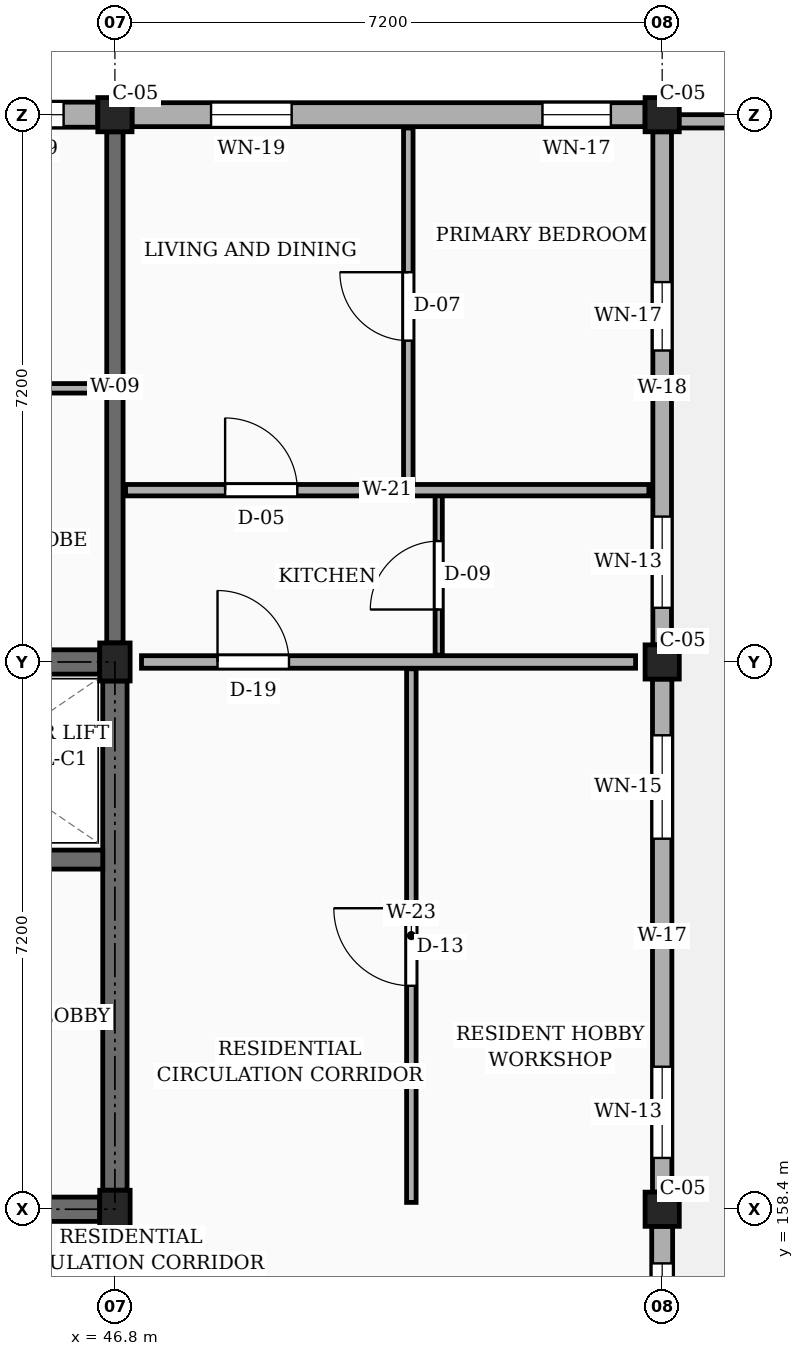
"""IFC4 building model, lengths in metres.
Left out: names, types, materials, properties, quantities, classifications, styles, units other than length and angle.
Written with IfcOpenShell. Run it as: python <this file> out.ifc"""

import sys

from ifc_helpers import new_model, si_unit, direction, frame, frame_2d, origin, origin_2d, place, context, subcontext, project, spatial, rectangle, extrude, element, fill, save


model = new_model("IFC4")
c1 = context("Model", 3, precision=1e-05, world=origin(), true_north=direction((0.0, 1.0)))
c2 = subcontext(c1, "Body", "Model", "MODEL_VIEW")
j1 = project(units=[si_unit("LENGTHUNIT", "METRE"), si_unit("PLANEANGLEUNIT", "RADIAN")], contexts=[c1])
p1 = place(None, origin())
s1 = spatial("IfcSite", under=j1, at=p1, CompositionType="ELEMENT")
p2 = place(p1, origin())
s2 = spatial("IfcBuilding", under=s1, at=p2, CompositionType="ELEMENT")
p3 = place(p2, frame((0.0, 0.0, 36.0)))
s3 = spatial("IfcBuildingStorey", under=s2, at=p3, CompositionType="ELEMENT", Elevation=36.0)
for number, where, z_axis, x_axis in (
    (1, (46.8, 158.4, 0.0), (0.0, 0.0, 1.0), (1.0, 0.0, 0.0)),
    (2, (46.8, 165.6, 0.0), (0.0, 0.0, 1.0), (1.0, 0.0, 0.0)),
):
    element("IfcColumn", number, at=place(p3, frame(where, z_axis=z_axis, x_axis=x_axis)), inside=s3, PredefinedType="COLUMN", context=c2, shape_type="SweptSolid", body=[
        extrude(rectangle(XDim=0.4, YDim=0.5, at=origin_2d()), origin(), (0.0, 0.0, 1.0), 3.15),
    ])
for number, where, z_axis, x_axis in (
    (3, (46.8, 172.8, 0.0), (0.0, 0.0, 1.0), (1.0, 0.0, 0.0)),
    (4, (54.0, 158.4, 0.0), (0.0, 0.0, 1.0), (1.0, 0.0, 0.0)),
    (5, (54.0, 165.6, 0.0), (0.0, 0.0, 1.0), (1.0, 0.0, 0.0)),
    (6, (54.0, 172.8, 0.0), (0.0, 0.0, 1.0), (1.0, 0.0, 0.0)),
):
    element("IfcColumn", number, at=place(p3, frame(where, z_axis=z_axis, x_axis=x_axis)), inside=s3, PredefinedType="COLUMN", context=c2, shape_type="SweptSolid", body=[
        extrude(rectangle(XDim=0.45, YDim=0.45, at=origin_2d()), origin(), (0.0, 0.0, 1.0), 3.15),
    ])
p4 = place(p3, frame((46.8, 165.85, 0.0), z_axis=(0.0, 0.0, 1.0), x_axis=(0.0, 1.0, 0.0)))
e7 = element("IfcWall", 7, at=p4, inside=s3, PredefinedType="SOLIDWALL", context=c2, shape_type="SweptSolid", body=[
    extrude(rectangle(XDim=6.725, YDim=0.215, at=frame_2d((3.362, 0.0))), origin(), (0.0, 0.0, 1.0), 2.185),
])
p5 = place(p3, frame((54.0, 151.425, 0.0), z_axis=(0.0, 0.0, 1.0), x_axis=(0.0, 1.0, 0.0)))
e8 = element("IfcWall", 8, at=p5, inside=s3, PredefinedType="SOLIDWALL", context=c2, shape_type="SweptSolid", body=[
    extrude(rectangle(XDim=6.75, YDim=0.275, at=frame_2d((3.375, 0.0))), origin(), (0.0, 0.0, 1.0), 2.455),
])
p6 = place(p5, frame((1.018, 0.0, 0.78)))
e9 = element("IfcOpeningElement", 9, at=p6, cuts=e8, PredefinedType="OPENING", context=c2, shape_type="SweptSolid", body=[
    extrude(rectangle(XDim=0.96, YDim=1.26, at=frame_2d((0.48, 0.63))), frame((0.0, 0.147, 0.0), z_axis=(0.0, -1.0, 0.0), x_axis=(1.0, 0.0, 0.0)), (0.0, 0.0, 1.0), 0.295),
])
p7 = place(p5, frame((3.305, 0.0, 0.78)))
e10 = element("IfcOpeningElement", 10, at=p7, cuts=e8, PredefinedType="OPENING", context=c2, shape_type="SweptSolid", body=[
    extrude(rectangle(XDim=1.12, YDim=1.26, at=frame_2d((0.56, 0.63))), frame((0.0, 0.147, 0.0), z_axis=(0.0, -1.0, 0.0), x_axis=(1.0, 0.0, 0.0)), (0.0, 0.0, 1.0), 0.295),
])
p8 = place(p5, frame((5.222, 0.0, 0.78)))
e11 = element("IfcOpeningElement", 11, at=p8, cuts=e8, PredefinedType="OPENING", context=c2, shape_type="SweptSolid", body=[
    extrude(rectangle(XDim=1.04, YDim=1.26, at=frame_2d((0.52, 0.63))), frame((0.0, 0.147, 0.0), z_axis=(0.0, -1.0, 0.0), x_axis=(1.0, 0.0, 0.0)), (0.0, 0.0, 1.0), 0.295),
])
p9 = place(p3, frame((54.0, 158.625, 0.0), z_axis=(0.0, 0.0, 1.0), x_axis=(0.0, 1.0, 0.0)))
e12 = element("IfcWall", 12, at=p9, inside=s3, PredefinedType="SOLIDWALL", context=c2, shape_type="SweptSolid", body=[
    extrude(rectangle(XDim=6.75, YDim=0.255, at=frame_2d((3.375, 0.0))), origin(), (0.0, 0.0, 1.0), 2.455),
])
p10 = place(p9, frame((0.45, 0.0, 0.78)))
e13 = element("IfcOpeningElement", 13, at=p10, cuts=e12, PredefinedType="OPENING", context=c2, shape_type="SweptSolid", body=[
    extrude(rectangle(XDim=1.2, YDim=1.26, at=frame_2d((0.6, 0.63))), frame((0.0, 0.137, 0.0), z_axis=(0.0, -1.0, 0.0), x_axis=(1.0, 0.0, 0.0)), (0.0, 0.0, 1.0), 0.275),
])
p11 = place(p9, frame((4.65, 0.0, 0.78)))
e14 = element("IfcOpeningElement", 14, at=p11, cuts=e12, PredefinedType="OPENING", context=c2, shape_type="SweptSolid", body=[
    extrude(rectangle(XDim=1.36, YDim=1.26, at=frame_2d((0.68, 0.63))), frame((0.0, 0.137, 0.0), z_axis=(0.0, -1.0, 0.0), x_axis=(1.0, 0.0, 0.0)), (0.0, 0.0, 1.0), 0.275),
])
p12 = place(p3, frame((54.0, 165.825, 0.0), z_axis=(0.0, 0.0, 1.0), x_axis=(0.0, 1.0, 0.0)))
e15 = element("IfcWall", 15, at=p12, inside=s3, PredefinedType="SOLIDWALL", context=c2, shape_type="SweptSolid", body=[
    extrude(rectangle(XDim=6.75, YDim=0.245, at=frame_2d((3.375, 0.0))), origin(), (0.0, 0.0, 1.0), 2.455),
])
p13 = place(p12, frame((0.488, 0.0, 0.78)))
e16 = element("IfcOpeningElement", 16, at=p13, cuts=e15, PredefinedType="OPENING", context=c2, shape_type="SweptSolid", body=[
    extrude(rectangle(XDim=1.2, YDim=1.26, at=frame_2d((0.6, 0.63))), frame((0.0, 0.133, 0.0), z_axis=(0.0, -1.0, 0.0), x_axis=(1.0, 0.0, 0.0)), (0.0, 0.0, 1.0), 0.265),
])
p14 = place(p12, frame((3.873, 0.0, 0.78)))
e17 = element("IfcOpeningElement", 17, at=p14, cuts=e15, PredefinedType="OPENING", context=c2, shape_type="SweptSolid", body=[
    extrude(rectangle(XDim=0.9, YDim=1.36, at=frame_2d((0.45, 0.68))), frame((0.0, 0.133, 0.0), z_axis=(0.0, -1.0, 0.0), x_axis=(1.0, 0.0, 0.0)), (0.0, 0.0, 1.0), 0.265),
])
p15 = place(p3, frame((53.775, 172.8, 0.0), z_axis=(0.0, 0.0, 1.0), x_axis=(-1.0, 0.0, 0.0)))
e18 = element("IfcWall", 18, at=p15, inside=s3, PredefinedType="SOLIDWALL", context=c2, shape_type="SweptSolid", body=[
    extrude(rectangle(XDim=6.75, YDim=0.315, at=frame_2d((3.375, 0.0))), origin(), (0.0, 0.0, 1.0), 2.455),
])
p16 = place(p15, frame((0.45, 0.0, 0.78)))
e19 = element("IfcOpeningElement", 19, at=p16, cuts=e18, PredefinedType="OPENING", context=c2, shape_type="SweptSolid", body=[
    extrude(rectangle(XDim=0.9, YDim=1.36, at=frame_2d((0.45, 0.68))), frame((0.0, 0.167, 0.0), z_axis=(0.0, -1.0, 0.0), x_axis=(1.0, 0.0, 0.0)), (0.0, 0.0, 1.0), 0.335),
])
p17 = place(p15, frame((4.65, 0.0, 0.78)))
e20 = element("IfcOpeningElement", 20, at=p17, cuts=e18, PredefinedType="OPENING", context=c2, shape_type="SweptSolid", body=[
    extrude(rectangle(XDim=1.06, YDim=1.36, at=frame_2d((0.53, 0.68))), frame((0.0, 0.167, 0.0), z_axis=(0.0, -1.0, 0.0), x_axis=(1.0, 0.0, 0.0)), (0.0, 0.0, 1.0), 0.335),
])
p18 = place(p3, frame((46.575, 172.8, 0.0), z_axis=(0.0, 0.0, 1.0), x_axis=(-1.0, 0.0, 0.0)))
e21 = element("IfcWall", 21, at=p18, inside=s3, PredefinedType="SOLIDWALL", context=c2, shape_type="SweptSolid", body=[
    extrude(rectangle(XDim=6.75, YDim=0.33, at=frame_2d((3.375, 0.0))), origin(), (0.0, 0.0, 1.0), 2.455),
])
p19 = place(p18, frame((0.45, 0.0, 0.78)))
e22 = element("IfcOpeningElement", 22, at=p19, cuts=e21, PredefinedType="OPENING", context=c2, shape_type="SweptSolid", body=[
    extrude(rectangle(XDim=1.06, YDim=1.36, at=frame_2d((0.53, 0.68))), frame((0.0, 0.175, 0.0), z_axis=(0.0, -1.0, 0.0), x_axis=(1.0, 0.0, 0.0)), (0.0, 0.0, 1.0), 0.35),
])
p20 = place(p18, frame((4.65, 0.0, 0.78)))
e23 = element("IfcOpeningElement", 23, at=p20, cuts=e21, PredefinedType="OPENING", context=c2, shape_type="SweptSolid", body=[
    extrude(rectangle(XDim=1.22, YDim=1.36, at=frame_2d((0.61, 0.68))), frame((0.0, 0.175, 0.0), z_axis=(0.0, -1.0, 0.0), x_axis=(1.0, 0.0, 0.0)), (0.0, 0.0, 1.0), 0.35),
])
p21 = place(p3, frame((54.0, 172.712, 0.0), z_axis=(0.0, 0.0, 1.0), x_axis=(1.0, 0.0, 0.0)))
e24 = element("IfcWall", 24, at=p21, inside=s3, PredefinedType="PARAPET", context=c2, shape_type="SweptSolid", body=[
    extrude(rectangle(XDim=7.025, YDim=0.175, at=frame_2d((3.512, 0.0))), origin(), (0.0, 0.0, 1.0), 1.1),
])
p22 = place(p3, frame((39.8, 165.6, 0.0), z_axis=(0.0, 0.0, 1.0), x_axis=(1.0, 0.0, 0.0)))
e25 = element("IfcWall", 25, at=p22, inside=s3, PredefinedType="SHEAR", context=c2, shape_type="SweptSolid", body=[
    extrude(rectangle(XDim=6.8, YDim=0.32, at=frame_2d((3.4, 0.0))), origin(), (0.0, 0.0, 1.0), 2.885),
])
p23 = place(p3, frame((46.8, 158.65, 0.0), z_axis=(0.0, 0.0, 1.0), x_axis=(0.0, 1.0, 0.0)))
e26 = element("IfcWall", 26, at=p23, inside=s3, PredefinedType="SHEAR", context=c2, shape_type="SweptSolid", body=[
    extrude(rectangle(XDim=6.7, YDim=0.32, at=frame_2d((3.35, 0.0))), origin(), (0.0, 0.0, 1.0), 2.885),
])
p24 = place(p3, frame((39.8, 158.4, 0.0), z_axis=(0.0, 0.0, 1.0), x_axis=(1.0, 0.0, 0.0)))
e27 = element("IfcWall", 27, at=p24, inside=s3, PredefinedType="SHEAR", context=c2, shape_type="SweptSolid", body=[
    extrude(rectangle(XDim=6.8, YDim=0.32, at=frame_2d((3.4, 0.0))), origin(), (0.0, 0.0, 1.0), 2.885),
])
p25 = place(p24, frame((4.55, 0.0, 0.0)))
e28 = element("IfcOpeningElement", 28, at=p25, cuts=e27, PredefinedType="OPENING", context=c2, shape_type="SweptSolid", body=[
    extrude(rectangle(XDim=1.1, YDim=2.15, at=frame_2d((0.55, 1.075))), frame((0.0, 0.17, 0.0), z_axis=(0.0, -1.0, 0.0), x_axis=(1.0, 0.0, 0.0)), (0.0, 0.0, 1.0), 0.34),
])
p26 = place(p3, frame((43.325, 163.0, 0.0), z_axis=(0.0, 0.0, 1.0), x_axis=(1.0, 0.0, 0.0)))
e29 = element("IfcWall", 29, at=p26, inside=s3, PredefinedType="SHEAR", context=c2, shape_type="SweptSolid", body=[
    extrude(rectangle(XDim=3.315, YDim=0.25, at=frame_2d((1.657, 0.0))), origin(), (0.0, 0.0, 1.0), 2.885),
])
p27 = place(p26, frame((1.1, 0.0, 0.0)))
e30 = element("IfcOpeningElement", 30, at=p27, cuts=e29, PredefinedType="OPENING", context=c2, shape_type="SweptSolid", body=[
    extrude(rectangle(XDim=1.0, YDim=2.2, at=frame_2d((0.5, 1.1))), frame((0.0, 0.135, 0.0), z_axis=(0.0, -1.0, 0.0), x_axis=(1.0, 0.0, 0.0)), (0.0, 0.0, 1.0), 0.27),
])
p28 = place(p3, frame((47.15, 165.6, 0.0), z_axis=(0.0, 0.0, 1.0), x_axis=(1.0, 0.0, 0.0)))
e31 = element("IfcWall", 31, at=p28, inside=s3, PredefinedType="PARTITIONING", context=c2, shape_type="SweptSolid", body=[
    extrude(rectangle(XDim=6.5, YDim=0.165, at=frame_2d((3.25, 0.0))), origin(), (0.0, 0.0, 1.0), 2.32),
])
p29 = place(p28, frame((1.0, 0.0, 0.0)))
e32 = element("IfcOpeningElement", 32, at=p29, cuts=e31, PredefinedType="OPENING", context=c2, shape_type="SweptSolid", body=[
    extrude(rectangle(XDim=0.94, YDim=2.12, at=frame_2d((0.47, 1.06))), frame((0.0, 0.093, 0.0), z_axis=(0.0, -1.0, 0.0), x_axis=(1.0, 0.0, 0.0)), (0.0, 0.0, 1.0), 0.185),
])
p30 = place(p3, frame((39.74, 169.2, 0.0), z_axis=(0.0, 0.0, 1.0), x_axis=(1.0, 0.0, 0.0)))
e33 = element("IfcWall", 33, at=p30, inside=s3, PredefinedType="PARTITIONING", context=c2, shape_type="SweptSolid", body=[
    extrude(rectangle(XDim=6.92, YDim=0.125, at=frame_2d((3.46, 0.0))), origin(), (0.0, 0.0, 1.0), 2.32),
])
p31 = place(p30, frame((1.05, 0.0, 0.0)))
e34 = element("IfcOpeningElement", 34, at=p31, cuts=e33, PredefinedType="OPENING", context=c2, shape_type="SweptSolid", body=[
    extrude(rectangle(XDim=0.87, YDim=2.05, at=frame_2d((0.435, 1.025))), frame((0.0, 0.073, 0.0), z_axis=(0.0, -1.0, 0.0), x_axis=(1.0, 0.0, 0.0)), (0.0, 0.0, 1.0), 0.145),
])
p32 = place(p30, frame((4.45, 0.0, 0.0)))
e35 = element("IfcOpeningElement", 35, at=p32, cuts=e33, PredefinedType="OPENING", context=c2, shape_type="SweptSolid", body=[
    extrude(rectangle(XDim=0.88, YDim=2.08, at=frame_2d((0.44, 1.04))), frame((0.0, 0.073, 0.0), z_axis=(0.0, -1.0, 0.0), x_axis=(1.0, 0.0, 0.0)), (0.0, 0.0, 1.0), 0.145),
])
p33 = place(p3, frame((50.7, 158.49, 0.0), z_axis=(0.0, 0.0, 1.0), x_axis=(0.0, 1.0, 0.0)))
e36 = element("IfcWall", 36, at=p33, inside=s3, PredefinedType="PARTITIONING", context=c2, shape_type="SweptSolid", body=[
    extrude(rectangle(XDim=7.02, YDim=0.125, at=frame_2d((3.51, 0.0))), origin(), (0.0, 0.0, 1.0), 2.32),
])
p34 = place(p33, frame((2.85, 0.0, 0.0)))
e37 = element("IfcOpeningElement", 37, at=p34, cuts=e36, PredefinedType="OPENING", context=c2, shape_type="SweptSolid", body=[
    extrude(rectangle(XDim=1.02, YDim=2.15, at=frame_2d((0.51, 1.075))), frame((0.0, 0.073, 0.0), z_axis=(0.0, -1.0, 0.0), x_axis=(1.0, 0.0, 0.0)), (0.0, 0.0, 1.0), 0.145),
])
p35 = place(p3, frame((50.66, 167.93, 0.0), z_axis=(0.0, 0.0, 1.0), x_axis=(0.0, 1.0, 0.0)))
e38 = element("IfcWall", 38, at=p35, inside=s3, PredefinedType="PARTITIONING", context=c2, shape_type="SweptSolid", body=[
    extrude(rectangle(XDim=4.695, YDim=0.125, at=frame_2d((2.348, 0.0))), origin(), (0.0, 0.0, 1.0), 2.32),
])
p36 = place(p35, frame((1.897, 0.0, 0.0)))
e39 = element("IfcOpeningElement", 39, at=p36, cuts=e38, PredefinedType="OPENING", context=c2, shape_type="SweptSolid", body=[
    extrude(rectangle(XDim=0.9, YDim=2.1, at=frame_2d((0.45, 1.05))), frame((0.0, 0.073, 0.0), z_axis=(0.0, -1.0, 0.0), x_axis=(1.0, 0.0, 0.0)), (0.0, 0.0, 1.0), 0.145),
])
p37 = place(p3, frame((51.06, 165.69, 0.0), z_axis=(0.0, 0.0, 1.0), x_axis=(0.0, 1.0, 0.0)))
e40 = element("IfcWall", 40, at=p37, inside=s3, PredefinedType="PARTITIONING", context=c2, shape_type="SweptSolid", body=[
    extrude(rectangle(XDim=2.1, YDim=0.095, at=frame_2d((1.05, 0.0))), origin(), (0.0, 0.0, 1.0), 2.32),
])
p38 = place(p37, frame((0.6, 0.0, 0.0)))
e41 = element("IfcOpeningElement", 41, at=p38, cuts=e40, PredefinedType="OPENING", context=c2, shape_type="SweptSolid", body=[
    extrude(rectangle(XDim=0.9, YDim=2.05, at=frame_2d((0.45, 1.025))), frame((0.0, 0.058, 0.0), z_axis=(0.0, -1.0, 0.0), x_axis=(1.0, 0.0, 0.0)), (0.0, 0.0, 1.0), 0.115),
])
p39 = place(p3, frame((46.94, 167.86, 0.0), z_axis=(0.0, 0.0, 1.0), x_axis=(1.0, 0.0, 0.0)))
e42 = element("IfcWall", 42, at=p39, inside=s3, PredefinedType="PARTITIONING", context=c2, shape_type="SweptSolid", body=[
    extrude(rectangle(XDim=6.885, YDim=0.15, at=frame_2d((3.442, 0.0))), origin(), (0.0, 0.0, 1.0), 2.32),
])
p40 = place(p39, frame((1.31, 0.0, 0.0)))
e43 = element("IfcOpeningElement", 43, at=p40, cuts=e42, PredefinedType="OPENING", context=c2, shape_type="SweptSolid", body=[
    extrude(rectangle(XDim=0.95, YDim=2.1, at=frame_2d((0.475, 1.05))), frame((0.0, 0.085, 0.0), z_axis=(0.0, -1.0, 0.0), x_axis=(1.0, 0.0, 0.0)), (0.0, 0.0, 1.0), 0.17),
])
p41 = place(p8, origin())
e44 = element("IfcWindow", 44, at=p41, inside=s3, PartitioningType="SINGLE_PANEL", PredefinedType="WINDOW", context=c2, shape_type="SweptSolid", body=[
    extrude(rectangle(XDim=1.04, YDim=1.26, at=frame_2d((0.52, 0.63))), frame((0.0, 0.03, 0.0), z_axis=(0.0, -1.0, 0.0), x_axis=(1.0, 0.0, 0.0)), (0.0, 0.0, 1.0), 0.06),
])
fill(e11, e44)
p42 = place(p10, origin())
e45 = element("IfcWindow", 45, at=p42, inside=s3, PartitioningType="SINGLE_PANEL", PredefinedType="WINDOW", context=c2, shape_type="SweptSolid", body=[
    extrude(rectangle(XDim=1.2, YDim=1.26, at=frame_2d((0.6, 0.63))), frame((0.0, 0.03, 0.0), z_axis=(0.0, -1.0, 0.0), x_axis=(1.0, 0.0, 0.0)), (0.0, 0.0, 1.0), 0.06),
])
fill(e13, e45)
p43 = place(p11, origin())
e46 = element("IfcWindow", 46, at=p43, inside=s3, PartitioningType="SINGLE_PANEL", PredefinedType="WINDOW", context=c2, shape_type="SweptSolid", body=[
    extrude(rectangle(XDim=1.36, YDim=1.26, at=frame_2d((0.68, 0.63))), frame((0.0, 0.03, 0.0), z_axis=(0.0, -1.0, 0.0), x_axis=(1.0, 0.0, 0.0)), (0.0, 0.0, 1.0), 0.06),
])
fill(e14, e46)
p44 = place(p13, origin())
e47 = element("IfcWindow", 47, at=p44, inside=s3, PartitioningType="SINGLE_PANEL", PredefinedType="WINDOW", context=c2, shape_type="SweptSolid", body=[
    extrude(rectangle(XDim=1.2, YDim=1.26, at=frame_2d((0.6, 0.63))), frame((0.0, 0.03, 0.0), z_axis=(0.0, -1.0, 0.0), x_axis=(1.0, 0.0, 0.0)), (0.0, 0.0, 1.0), 0.06),
])
fill(e16, e47)
p45 = place(p14, origin())
e48 = element("IfcWindow", 48, at=p45, inside=s3, PartitioningType="SINGLE_PANEL", PredefinedType="WINDOW", context=c2, shape_type="SweptSolid", body=[
    extrude(rectangle(XDim=0.9, YDim=1.36, at=frame_2d((0.45, 0.68))), frame((0.0, 0.03, 0.0), z_axis=(0.0, -1.0, 0.0), x_axis=(1.0, 0.0, 0.0)), (0.0, 0.0, 1.0), 0.06),
])
fill(e17, e48)
p46 = place(p16, origin())
e49 = element("IfcWindow", 49, at=p46, inside=s3, PartitioningType="SINGLE_PANEL", PredefinedType="WINDOW", context=c2, shape_type="SweptSolid", body=[
    extrude(rectangle(XDim=0.9, YDim=1.36, at=frame_2d((0.45, 0.68))), frame((0.0, 0.03, 0.0), z_axis=(0.0, -1.0, 0.0), x_axis=(1.0, 0.0, 0.0)), (0.0, 0.0, 1.0), 0.06),
])
fill(e19, e49)
p47 = place(p17, origin())
e50 = element("IfcWindow", 50, at=p47, inside=s3, PartitioningType="SINGLE_PANEL", PredefinedType="WINDOW", context=c2, shape_type="SweptSolid", body=[
    extrude(rectangle(XDim=1.06, YDim=1.36, at=frame_2d((0.53, 0.68))), frame((0.0, 0.03, 0.0), z_axis=(0.0, -1.0, 0.0), x_axis=(1.0, 0.0, 0.0)), (0.0, 0.0, 1.0), 0.06),
])
fill(e20, e50)
p48 = place(p19, origin())
e51 = element("IfcWindow", 51, at=p48, inside=s3, PartitioningType="SINGLE_PANEL", PredefinedType="WINDOW", context=c2, shape_type="SweptSolid", body=[
    extrude(rectangle(XDim=1.06, YDim=1.36, at=frame_2d((0.53, 0.68))), frame((0.0, 0.03, 0.0), z_axis=(0.0, -1.0, 0.0), x_axis=(1.0, 0.0, 0.0)), (0.0, 0.0, 1.0), 0.06),
])
fill(e22, e51)
p49 = place(p29, origin())
e52 = element("IfcDoor", 52, at=p49, inside=s3, OperationType="SINGLE_SWING_LEFT", PredefinedType="DOOR", context=c2, shape_type="SweptSolid", body=[
    extrude(rectangle(XDim=0.94, YDim=2.12, at=frame_2d((0.47, 1.06))), frame((0.0, 0.025, 0.0), z_axis=(0.0, -1.0, 0.0), x_axis=(1.0, 0.0, 0.0)), (0.0, 0.0, 1.0), 0.05),
])
fill(e32, e52)
p50 = place(p34, origin())
e53 = element("IfcDoor", 53, at=p50, inside=s3, OperationType="SINGLE_SWING_RIGHT", PredefinedType="DOOR", context=c2, shape_type="SweptSolid", body=[
    extrude(rectangle(XDim=1.02, YDim=2.15, at=frame_2d((0.51, 1.075))), frame((0.0, 0.025, 0.0), z_axis=(0.0, -1.0, 0.0), x_axis=(1.0, 0.0, 0.0)), (0.0, 0.0, 1.0), 0.05),
])
fill(e37, e53)
p51 = place(p36, origin())
e54 = element("IfcDoor", 54, at=p51, inside=s3, OperationType="SINGLE_SWING_RIGHT", PredefinedType="DOOR", context=c2, shape_type="SweptSolid", body=[
    extrude(rectangle(XDim=0.9, YDim=2.1, at=frame_2d((0.45, 1.05))), frame((0.0, 0.025, 0.0), z_axis=(0.0, -1.0, 0.0), x_axis=(1.0, 0.0, 0.0)), (0.0, 0.0, 1.0), 0.05),
])
fill(e39, e54)
p52 = place(p38, origin())
e55 = element("IfcDoor", 55, at=p52, inside=s3, OperationType="SINGLE_SWING_LEFT", PredefinedType="DOOR", context=c2, shape_type="SweptSolid", body=[
    extrude(rectangle(XDim=0.9, YDim=2.05, at=frame_2d((0.45, 1.025))), frame((0.0, 0.025, 0.0), z_axis=(0.0, -1.0, 0.0), x_axis=(1.0, 0.0, 0.0)), (0.0, 0.0, 1.0), 0.05),
])
fill(e41, e55)
p53 = place(p40, origin())
e56 = element("IfcDoor", 56, at=p53, inside=s3, OperationType="SINGLE_SWING_LEFT", PredefinedType="DOOR", context=c2, shape_type="SweptSolid", body=[
    extrude(rectangle(XDim=0.95, YDim=2.1, at=frame_2d((0.475, 1.05))), frame((0.0, 0.025, 0.0), z_axis=(0.0, -1.0, 0.0), x_axis=(1.0, 0.0, 0.0)), (0.0, 0.0, 1.0), 0.05),
])
fill(e43, e56)
save(model, sys.argv[1])
